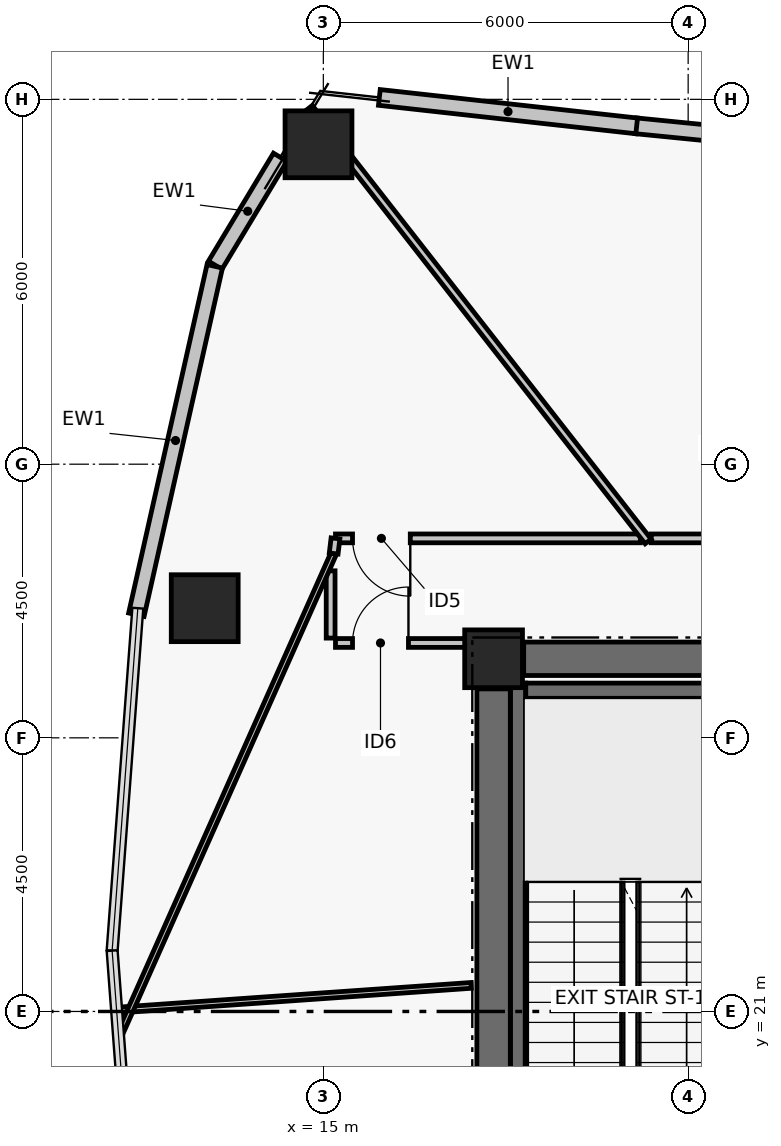
"""IFC4 building model, lengths in metres.
Left out: names, types, materials, properties, quantities, classifications, styles, units other than length and angle.
Written with IfcOpenShell. Run it as: python <this file> out.ifc"""

import sys

from ifc_helpers import new_model, si_unit, direction, frame, frame_2d, origin, origin_2d, place, context, subcontext, project, spatial, rectangle, hollow_rectangle, extrude, element, fill, save


model = new_model("IFC4")
c1 = context("Model", 3, precision=1e-05, world=origin(), true_north=direction((0.0, 1.0)))
c2 = subcontext(c1, "Body", "Model", "MODEL_VIEW")
j1 = project(units=[si_unit("LENGTHUNIT", "METRE"), si_unit("PLANEANGLEUNIT", "RADIAN")], contexts=[c1])
p1 = place(None, origin())
s1 = spatial("IfcSite", under=j1, at=p1, CompositionType="ELEMENT")
p2 = place(p1, origin())
s2 = spatial("IfcBuilding", under=s1, at=p2, CompositionType="ELEMENT")
p3 = place(p2, frame((0.0, 0.0, 161.76)))
s3 = spatial("IfcBuildingStorey", under=s2, at=p3, CompositionType="ELEMENT", Elevation=161.76)
p4 = place(p3, frame((17.8, 26.8, 0.0), z_axis=(0.0, 0.0, 1.0), x_axis=(1.0, 0.0, 0.0)))
e1 = element("IfcColumn", 1, at=p4, inside=s3, PredefinedType="COLUMN", context=c2, shape_type="SweptSolid", body=[
    extrude(rectangle(XDim=0.95, YDim=0.95, at=origin_2d()), origin(), (0.0, 0.0, 1.0), 3.72),
])
p5 = place(p3, frame((18.295, 26.8, 0.0), z_axis=(0.0, 0.0, 1.0), x_axis=(1.0, 0.0, 0.0)))
e2 = element("IfcWall", 2, at=p5, inside=s3, PredefinedType="SHEAR", context=c2, shape_type="SweptSolid", body=[
    extrude(rectangle(XDim=3.26, YDim=0.55, at=frame_2d((1.63, 0.0))), origin(), (0.0, 0.0, 1.0), 3.5),
])
p6 = place(p3, frame((17.8, 17.695, 0.0), z_axis=(0.0, 0.0, 1.0), x_axis=(0.0, 1.0, 0.0)))
e3 = element("IfcWall", 3, at=p6, inside=s3, PredefinedType="SHEAR", context=c2, shape_type="SweptSolid", body=[
    extrude(rectangle(XDim=8.61, YDim=0.55, at=frame_2d((4.305, 0.0))), origin(), (0.0, 0.0, 1.0), 3.5),
])
p7 = place(p3, frame((18.204, 17.6, 0.0), z_axis=(0.0, 0.0, 1.0), x_axis=(0.0, 1.0, 0.0)))
e4 = element("IfcWall", 4, at=p7, inside=s3, PredefinedType="SHEAR", context=c2, shape_type="SweptSolid", body=[
    extrude(rectangle(XDim=8.8, YDim=0.25, at=frame_2d((4.4, 0.0))), origin(), (0.0, 0.0, 1.0), 3.5),
])
p8 = place(p3, frame((18.329, 26.275, 0.0), z_axis=(0.0, 0.0, 1.0), x_axis=(1.0, 0.0, 0.0)))
e5 = element("IfcWall", 5, at=p8, inside=s3, PredefinedType="SHEAR", context=c2, shape_type="SweptSolid", body=[
    extrude(rectangle(XDim=3.471, YDim=0.25, at=frame_2d((1.735, 0.0))), origin(), (0.0, 0.0, 1.0), 3.5),
])
for number, where, z_axis, x_axis in (
    (6, (14.92, 35.26, 0.0), (0.0, 0.0, 1.0), (1.0, 0.0, 0.0)),
    (7, (13.049, 27.632, 0.0), (0.0, 0.0, 1.0), (1.0, 0.0, 0.0)),
):
    element("IfcColumn", number, at=place(p3, frame(where, z_axis=z_axis, x_axis=x_axis)), inside=s3, PredefinedType="COLUMN", context=c2, shape_type="SweptSolid", body=[
        extrude(hollow_rectangle(XDim=1.1, YDim=1.1, WallThickness=0.045, at=origin_2d()), origin(), (0.0, 0.0, 1.0), 3.72),
    ])
p9 = place(p3, frame((20.141, 35.565, 0.0), z_axis=(0.0, 0.0, 1.0), x_axis=(0.9950896707, -0.098977508888, 0.0)))
e8 = element("IfcWall", 8, at=p9, inside=s3, PredefinedType="PARTITIONING", context=c2, shape_type="SweptSolid", body=[
    extrude(rectangle(XDim=9.28, YDim=0.26, at=frame_2d((4.64, 0.0))), origin(), (0.0, 0.0, 1.0), 3.5),
])
p10 = place(p3, frame((15.921, 36.031, 0.0), z_axis=(0.0, 0.0, 1.0), x_axis=(0.993933978819, -0.109978387641, 0.0)))
e9 = element("IfcWall", 9, at=p10, inside=s3, PredefinedType="PARTITIONING", context=c2, shape_type="SweptSolid", body=[
    extrude(rectangle(XDim=4.258, YDim=0.26, at=frame_2d((2.129, 0.0))), origin(), (0.0, 0.0, 1.0), 3.5),
])
p11 = place(p3, frame((13.221, 33.272, 0.0), z_axis=(0.0, 0.0, 1.0), x_axis=(0.516157331647, 0.856493788061, 0.0)))
e10 = element("IfcWall", 10, at=p11, inside=s3, PredefinedType="PARTITIONING", context=c2, shape_type="SweptSolid", body=[
    extrude(rectangle(XDim=2.073, YDim=0.26, at=frame_2d((1.037, 0.0))), origin(), (0.0, 0.0, 1.0), 3.5),
])
p12 = place(p3, frame((11.925, 27.524, 0.0), z_axis=(0.0, 0.0, 1.0), x_axis=(0.219491422264, 0.975614429758, 0.0)))
e11 = element("IfcWall", 11, at=p12, inside=s3, PredefinedType="PARTITIONING", context=c2, shape_type="SweptSolid", body=[
    extrude(rectangle(XDim=5.873, YDim=0.26, at=frame_2d((2.937, 0.0))), origin(), (0.0, 0.0, 1.0), 3.5),
])
p13 = place(p3, frame((27.729, 28.78, 0.0), z_axis=(0.0, 0.0, 1.0), x_axis=(-1.0, 0.0, 0.0)))
e12 = element("IfcWall", 12, at=p13, inside=s3, PredefinedType="PARTITIONING", context=c2, shape_type="SweptSolid", body=[
    extrude(rectangle(XDim=7.338, YDim=0.145, at=frame_2d((3.669, 0.0))), origin(), (0.0, 0.0, 1.0), 2.73),
])
p14 = place(p13, frame((1.744, 0.0, 0.0)))
e13 = element("IfcOpeningElement", 13, at=p14, cuts=e12, PredefinedType="OPENING", context=c2, shape_type="SweptSolid", body=[
    extrude(rectangle(XDim=0.92, YDim=2.05, at=frame_2d((0.46, 1.025))), frame((0.0, 0.083, 0.0), z_axis=(0.0, -1.0, 0.0), x_axis=(1.0, 0.0, 0.0)), (0.0, 0.0, 1.0), 0.165),
])
p15 = place(p3, frame((20.214, 28.78, 0.0), z_axis=(0.0, 0.0, 1.0), x_axis=(-1.0, 0.0, 0.0)))
e14 = element("IfcWall", 14, at=p15, inside=s3, PredefinedType="PARTITIONING", context=c2, shape_type="SweptSolid", body=[
    extrude(rectangle(XDim=5.014, YDim=0.145, at=frame_2d((2.507, 0.0))), origin(), (0.0, 0.0, 1.0), 2.73),
])
p16 = place(p15, frame((3.784, 0.0, 0.0)))
e15 = element("IfcOpeningElement", 15, at=p16, cuts=e14, PredefinedType="OPENING", context=c2, shape_type="SweptSolid", body=[
    extrude(rectangle(XDim=0.95, YDim=2.06, at=frame_2d((0.475, 1.03))), frame((0.0, 0.083, 0.0), z_axis=(0.0, -1.0, 0.0), x_axis=(1.0, 0.0, 0.0)), (0.0, 0.0, 1.0), 0.165),
])
p17 = place(p3, frame((15.2, 27.06, 0.0), z_axis=(0.0, 0.0, 1.0), x_axis=(1.0, 0.0, 0.0)))
e16 = element("IfcWall", 16, at=p17, inside=s3, PredefinedType="PARTITIONING", context=c2, shape_type="SweptSolid", body=[
    extrude(rectangle(XDim=2.18, YDim=0.145, at=frame_2d((1.09, 0.0))), origin(), (0.0, 0.0, 1.0), 2.73),
])
p18 = place(p17, frame((0.28, 0.0, 0.0)))
e17 = element("IfcOpeningElement", 17, at=p18, cuts=e16, PredefinedType="OPENING", context=c2, shape_type="SweptSolid", body=[
    extrude(rectangle(XDim=0.92, YDim=2.05, at=frame_2d((0.46, 1.025))), frame((0.0, 0.083, 0.0), z_axis=(0.0, -1.0, 0.0), x_axis=(1.0, 0.0, 0.0)), (0.0, 0.0, 1.0), 0.165),
])
p19 = place(p3, frame((15.12, 28.247, 0.0), z_axis=(0.0, 0.0, 1.0), x_axis=(0.0, -1.0, 0.0)))
e18 = element("IfcWall", 18, at=p19, inside=s3, PredefinedType="PARTITIONING", context=c2, shape_type="SweptSolid", body=[
    extrude(rectangle(XDim=1.107, YDim=0.145, at=frame_2d((0.553, 0.0))), origin(), (0.0, 0.0, 1.0), 2.73),
])
p20 = place(p3, frame((20.342, 28.73, 0.0), z_axis=(0.0, 0.0, 1.0), x_axis=(-0.615659223334, 0.78801251305, 0.0)))
e19 = element("IfcWall", 19, at=p20, inside=s3, PredefinedType="PARTITIONING", context=c2, shape_type="SweptSolid", body=[
    extrude(rectangle(XDim=9.05, YDim=0.125, at=frame_2d((4.525, 0.0))), origin(), (0.0, 0.0, 1.0), 2.93),
])
p21 = place(p3, frame((17.43, 21.429, 0.0), z_axis=(0.0, 0.0, 1.0), x_axis=(-0.997563032527, -0.069771026481, 0.0)))
e20 = element("IfcWall", 20, at=p21, inside=s3, PredefinedType="PARTITIONING", context=c2, shape_type="SweptSolid", body=[
    extrude(rectangle(XDim=5.854, YDim=0.095, at=frame_2d((2.927, 0.0))), origin(), (0.0, 0.0, 1.0), 2.63),
])
p22 = place(p3, frame((15.17, 28.531, 0.0), z_axis=(0.0, 0.0, 1.0), x_axis=(-0.406717829794, -0.913553833623, 0.0)))
e21 = element("IfcWall", 21, at=p22, inside=s3, PredefinedType="PARTITIONING", context=c2, shape_type="SweptSolid", body=[
    extrude(rectangle(XDim=8.718, YDim=0.095, at=frame_2d((4.359, 0.0))), origin(), (0.0, 0.0, 1.0), 2.73),
])
p23 = place(p3, frame((15.2, 28.78, 0.0), z_axis=(0.0, 0.0, 1.0), x_axis=(-0.119720914767, -0.992807585873, 0.0)))
e22 = element("IfcWall", 22, at=p23, inside=s3, PredefinedType="PARTITIONING", context=c2, shape_type="SweptSolid", body=[
    extrude(rectangle(XDim=0.251, YDim=0.145, at=frame_2d((0.125, 0.0))), origin(), (0.0, 0.0, 1.0), 3.5),
])
p24 = place(p16, origin())
e23 = element("IfcDoor", 23, at=p24, inside=s3, OperationType="SINGLE_SWING_LEFT", PredefinedType="DOOR", context=c2, shape_type="SweptSolid", body=[
    extrude(rectangle(XDim=0.95, YDim=2.06, at=frame_2d((0.475, 1.03))), frame((0.0, 0.025, 0.0), z_axis=(0.0, -1.0, 0.0), x_axis=(1.0, 0.0, 0.0)), (0.0, 0.0, 1.0), 0.05),
])
fill(e15, e23)
p25 = place(p18, origin())
e24 = element("IfcDoor", 24, at=p25, inside=s3, OperationType="SINGLE_SWING_RIGHT", PredefinedType="DOOR", context=c2, shape_type="SweptSolid", body=[
    extrude(rectangle(XDim=0.92, YDim=2.05, at=frame_2d((0.46, 1.025))), frame((0.0, 0.025, 0.0), z_axis=(0.0, -1.0, 0.0), x_axis=(1.0, 0.0, 0.0)), (0.0, 0.0, 1.0), 0.05),
])
fill(e17, e24)
save(model, sys.argv[1])
